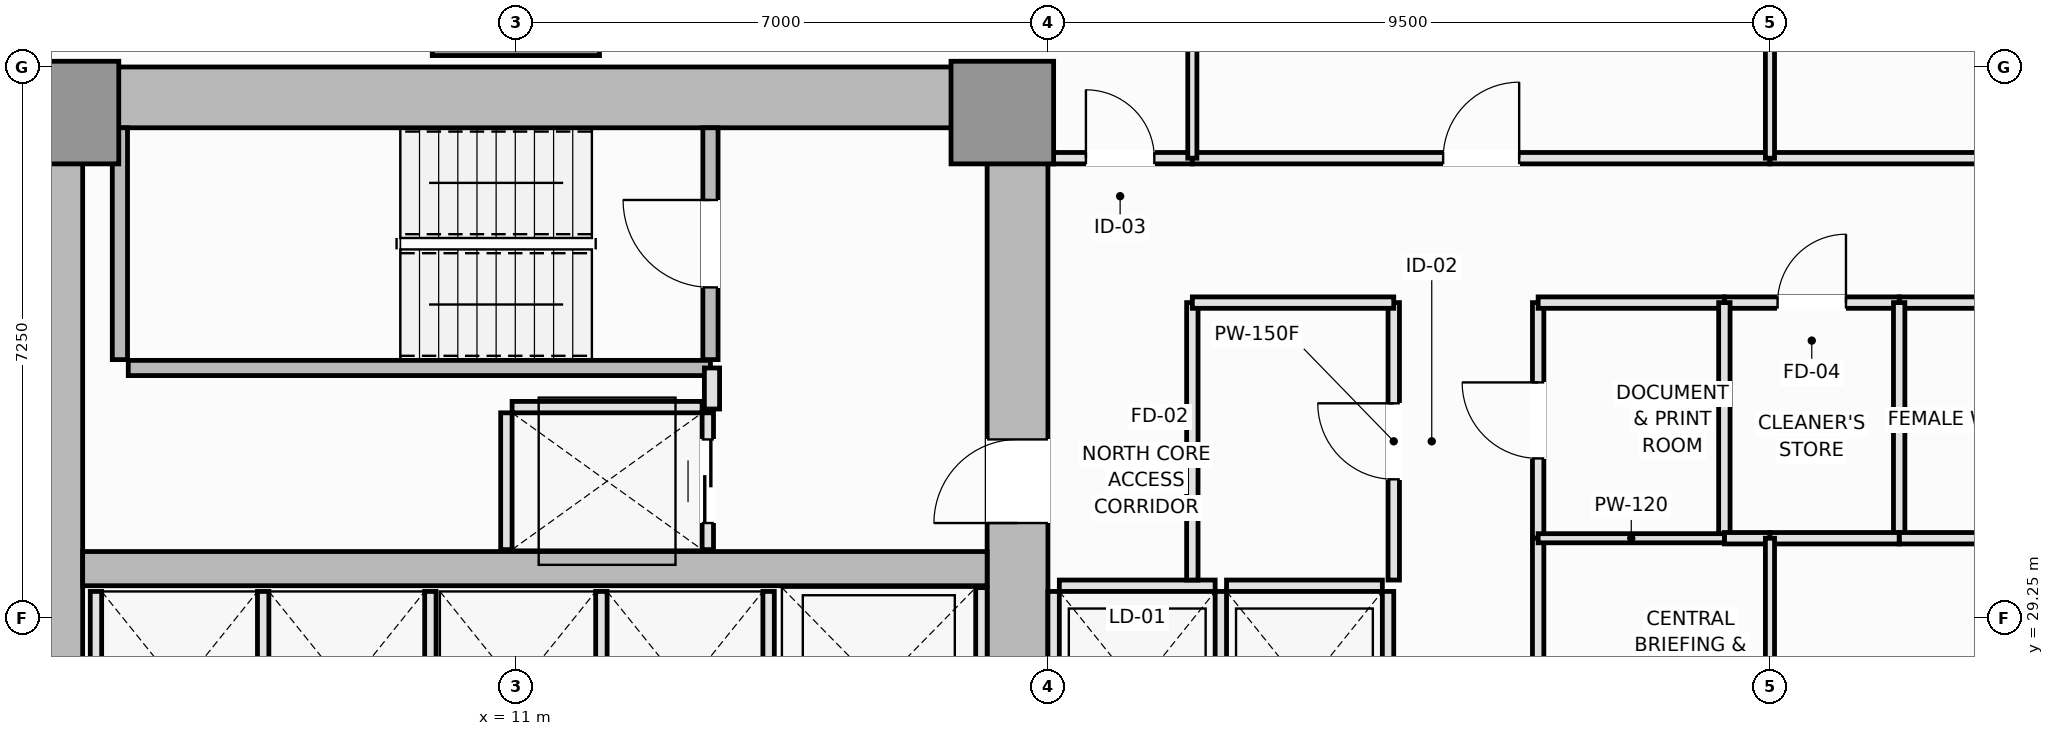
"""IFC4 building model, lengths in metres.
Left out: names, types, materials, properties, quantities, classifications, styles, units other than length and angle.
Written with IfcOpenShell. Run it as: python <this file> out.ifc"""

import sys

from ifc_helpers import new_model, si_unit, direction, frame, frame_2d, origin, origin_2d, place, context, subcontext, project, spatial, rectangle, extrude, element, fill, save


model = new_model("IFC4")
c1 = context("Model", 3, precision=1e-05, world=origin(), true_north=direction((0.0, 1.0)))
c2 = subcontext(c1, "Body", "Model", "MODEL_VIEW")
j1 = project(units=[si_unit("LENGTHUNIT", "METRE"), si_unit("PLANEANGLEUNIT", "RADIAN")], contexts=[c1])
p1 = place(None, origin())
s1 = spatial("IfcSite", under=j1, at=p1, CompositionType="ELEMENT")
p2 = place(p1, origin())
s2 = spatial("IfcBuilding", under=s1, at=p2, CompositionType="ELEMENT")
p3 = place(p2, frame((0.0, 0.0, 39.8)))
s3 = spatial("IfcBuildingStorey", under=s2, at=p3, CompositionType="ELEMENT", Elevation=39.8)
p4 = place(p3, frame((4.5, 36.1, 0.0), z_axis=(0.0, 0.0, 1.0), x_axis=(1.0, 0.0, 0.0)))
e1 = element("IfcWall", 1, at=p4, inside=s3, PredefinedType="SHEAR", context=c2, shape_type="SweptSolid", body=[
    extrude(rectangle(XDim=13.5, YDim=0.8, at=frame_2d((6.75, 0.0))), origin(), (0.0, 0.0, 1.0), 3.55),
])
p5 = place(p3, frame((4.9, 14.8, 0.0), z_axis=(0.0, 0.0, 1.0), x_axis=(0.0, 1.0, 0.0)))
e2 = element("IfcWall", 2, at=p5, inside=s3, PredefinedType="SHEAR", context=c2, shape_type="SweptSolid", body=[
    extrude(rectangle(XDim=20.9, YDim=0.8, at=frame_2d((10.45, 0.0))), origin(), (0.0, 0.0, 1.0), 3.55),
])
p6 = place(p3, frame((17.6, 27.05, 0.0), z_axis=(0.0, 0.0, 1.0), x_axis=(0.0, 1.0, 0.0)))
e3 = element("IfcWall", 3, at=p6, inside=s3, PredefinedType="SHEAR", context=c2, shape_type="SweptSolid", body=[
    extrude(rectangle(XDim=8.65, YDim=0.8, at=frame_2d((4.325, 0.0))), origin(), (0.0, 0.0, 1.0), 3.55),
])
p7 = place(p6, frame((3.45, 0.0, 0.0)))
e4 = element("IfcOpeningElement", 4, at=p7, cuts=e3, PredefinedType="OPENING", context=c2, shape_type="SweptSolid", body=[
    extrude(rectangle(XDim=1.1, YDim=2.15, at=frame_2d((0.55, 1.075))), frame((0.0, 0.41, 0.0), z_axis=(0.0, -1.0, 0.0), x_axis=(1.0, 0.0, 0.0)), (0.0, 0.0, 1.0), 0.82),
])
p8 = place(p3, frame((5.3, 29.9, 0.0), z_axis=(0.0, 0.0, 1.0), x_axis=(1.0, 0.0, 0.0)))
e5 = element("IfcWall", 5, at=p8, inside=s3, PredefinedType="SHEAR", context=c2, shape_type="SweptSolid", body=[
    extrude(rectangle(XDim=11.9, YDim=0.45, at=frame_2d((5.95, 0.0))), origin(), (0.0, 0.0, 1.0), 3.55),
])
for number, where, z_axis, x_axis in (
    (6, (5.1, 35.9, 0.0), (0.0, 0.0, 1.0), (1.0, 0.0, 0.0)),
    (7, (17.4, 35.9, 0.0), (0.0, 0.0, 1.0), (1.0, 0.0, 0.0)),
):
    element("IfcColumn", number, at=place(p3, frame(where, z_axis=z_axis, x_axis=x_axis)), inside=s3, PredefinedType="PILASTER", context=c2, shape_type="SweptSolid", body=[
        extrude(rectangle(XDim=1.35, YDim=1.35, at=origin_2d()), origin(), (0.0, 0.0, 1.0), 3.55),
    ])
p9 = place(p3, frame((11.0, 37.75, 0.0), z_axis=(0.0, 0.0, 1.0), x_axis=(1.0, 0.0, 0.0)))
e8 = element("IfcColumn", 8, at=p9, inside=s3, PredefinedType="COLUMN", context=c2, shape_type="SweptSolid", body=[
    extrude(rectangle(XDim=2.2, YDim=2.2, at=origin_2d()), origin(), (0.0, 0.0, 1.0), 3.55),
])
p10 = place(p3, frame((5.79, 32.65, 0.0), z_axis=(0.0, 0.0, 1.0), x_axis=(0.0, 1.0, 0.0)))
e9 = element("IfcWall", 9, at=p10, inside=s3, PredefinedType="SOLIDWALL", context=c2, shape_type="SweptSolid", body=[
    extrude(rectangle(XDim=3.05, YDim=0.2, at=frame_2d((1.525, 0.0))), origin(), (0.0, 0.0, 1.0), 3.55),
])
p11 = place(p3, frame((5.9, 32.54, 0.0), z_axis=(0.0, 0.0, 1.0), x_axis=(1.0, 0.0, 0.0)))
e10 = element("IfcWall", 10, at=p11, inside=s3, PredefinedType="SOLIDWALL", context=c2, shape_type="SweptSolid", body=[
    extrude(rectangle(XDim=7.66, YDim=0.2, at=frame_2d((3.83, 0.0))), origin(), (0.0, 0.0, 1.0), 3.55),
])
p12 = place(p3, frame((13.56, 32.65, 0.0), z_axis=(0.0, 0.0, 1.0), x_axis=(0.0, 1.0, 0.0)))
e11 = element("IfcWall", 11, at=p12, inside=s3, PredefinedType="SOLIDWALL", context=c2, shape_type="SweptSolid", body=[
    extrude(rectangle(XDim=3.05, YDim=0.2, at=frame_2d((1.525, 0.0))), origin(), (0.0, 0.0, 1.0), 3.55),
])
p13 = place(p12, frame((0.95, 0.0, 0.0)))
e12 = element("IfcOpeningElement", 12, at=p13, cuts=e11, PredefinedType="OPENING", context=c2, shape_type="SweptSolid", body=[
    extrude(rectangle(XDim=1.15, YDim=2.15, at=frame_2d((0.575, 1.075))), frame((0.0, 0.11, 0.0), z_axis=(0.0, -1.0, 0.0), x_axis=(1.0, 0.0, 0.0)), (0.0, 0.0, 1.0), 0.22),
])
p14 = place(p3, frame((18.15, 29.675, 0.0), z_axis=(0.0, 0.0, 1.0), x_axis=(1.0, 0.0, 0.0)))
e13 = element("IfcWall", 13, at=p14, inside=s3, PredefinedType="PARTITIONING", context=c2, shape_type="SweptSolid", body=[
    extrude(rectangle(XDim=2.05, YDim=0.15, at=frame_2d((1.025, 0.0))), origin(), (0.0, 0.0, 1.0), 3.37),
])
for number, where, z_axis, x_axis in (
    (14, (18.075, 27.05, 0.0), (0.0, 0.0, 1.0), (0.0, 1.0, 0.0)),
    (15, (20.275, 27.05, 0.0), (0.0, 0.0, 1.0), (0.0, 1.0, 0.0)),
):
    element("IfcWall", number, at=place(p3, frame(where, z_axis=z_axis, x_axis=x_axis)), inside=s3, PredefinedType="PARTITIONING", context=c2, shape_type="SweptSolid", body=[
        extrude(rectangle(XDim=2.55, YDim=0.15, at=frame_2d((1.275, 0.0))), origin(), (0.0, 0.0, 1.0), 3.37),
    ])
p15 = place(p3, frame((20.35, 29.675, 0.0), z_axis=(0.0, 0.0, 1.0), x_axis=(1.0, 0.0, 0.0)))
e16 = element("IfcWall", 16, at=p15, inside=s3, PredefinedType="PARTITIONING", context=c2, shape_type="SweptSolid", body=[
    extrude(rectangle(XDim=2.05, YDim=0.15, at=frame_2d((1.025, 0.0))), origin(), (0.0, 0.0, 1.0), 3.37),
])
for number, where, z_axis, x_axis in (
    (17, (22.475, 27.05, 0.0), (0.0, 0.0, 1.0), (0.0, 1.0, 0.0)),
    (18, (5.475, 27.05, 0.0), (0.0, 0.0, 1.0), (0.0, 1.0, 0.0)),
    (19, (7.675, 27.05, 0.0), (0.0, 0.0, 1.0), (0.0, 1.0, 0.0)),
    (20, (9.875, 27.05, 0.0), (0.0, 0.0, 1.0), (0.0, 1.0, 0.0)),
    (21, (12.125, 27.05, 0.0), (0.0, 0.0, 1.0), (0.0, 1.0, 0.0)),
    (22, (14.325, 27.05, 0.0), (0.0, 0.0, 1.0), (0.0, 1.0, 0.0)),
):
    element("IfcWall", number, at=place(p3, frame(where, z_axis=z_axis, x_axis=x_axis)), inside=s3, PredefinedType="PARTITIONING", context=c2, shape_type="SweptSolid", body=[
        extrude(rectangle(XDim=2.55, YDim=0.15, at=frame_2d((1.275, 0.0))), origin(), (0.0, 0.0, 1.0), 3.37),
    ])
p16 = place(p3, frame((17.125, 27.05, 0.0), z_axis=(0.0, 0.0, 1.0), x_axis=(0.0, 1.0, 0.0)))
e23 = element("IfcWall", 23, at=p16, inside=s3, PredefinedType="PARTITIONING", context=c2, shape_type="SweptSolid", body=[
    extrude(rectangle(XDim=2.6, YDim=0.15, at=frame_2d((1.3, 0.0))), origin(), (0.0, 0.0, 1.0), 3.37),
])
p17 = place(p3, frame((10.95, 32.025, 0.0), z_axis=(0.0, 0.0, 1.0), x_axis=(1.0, 0.0, 0.0)))
e24 = element("IfcWall", 24, at=p17, inside=s3, PredefinedType="PARTITIONING", context=c2, shape_type="SweptSolid", body=[
    extrude(rectangle(XDim=2.5, YDim=0.15, at=frame_2d((1.25, 0.0))), origin(), (0.0, 0.0, 1.0), 3.37),
])
p18 = place(p3, frame((10.875, 30.15, 0.0), z_axis=(0.0, 0.0, 1.0), x_axis=(0.0, 1.0, 0.0)))
e25 = element("IfcWall", 25, at=p18, inside=s3, PredefinedType="PARTITIONING", context=c2, shape_type="SweptSolid", body=[
    extrude(rectangle(XDim=1.8, YDim=0.15, at=frame_2d((0.9, 0.0))), origin(), (0.0, 0.0, 1.0), 3.37),
])
p19 = place(p3, frame((13.525, 30.15, 0.0), z_axis=(0.0, 0.0, 1.0), x_axis=(0.0, 1.0, 0.0)))
e26 = element("IfcWall", 26, at=p19, inside=s3, PredefinedType="PARTITIONING", context=c2, shape_type="SweptSolid", body=[
    extrude(rectangle(XDim=1.8, YDim=0.15, at=frame_2d((0.9, 0.0))), origin(), (0.0, 0.0, 1.0), 3.37),
])
p20 = place(p19, frame((0.35, 0.0, 0.0)))
e27 = element("IfcOpeningElement", 27, at=p20, cuts=e26, PredefinedType="OPENING", context=c2, shape_type="SweptSolid", body=[
    extrude(rectangle(XDim=1.1, YDim=2.2, at=frame_2d((0.55, 1.1))), frame((0.0, 0.085, 0.0), z_axis=(0.0, -1.0, 0.0), x_axis=(1.0, 0.0, 0.0)), (0.0, 0.0, 1.0), 0.17),
])
p21 = place(p3, frame((13.58, 32.0, 0.0), z_axis=(0.0, 0.0, 1.0), x_axis=(0.0, 1.0, 0.0)))
e28 = element("IfcWall", 28, at=p21, inside=s3, PredefinedType="PARTITIONING", context=c2, shape_type="SweptSolid", body=[
    extrude(rectangle(XDim=0.54, YDim=0.2, at=frame_2d((0.27, 0.0))), origin(), (0.0, 0.0, 1.0), 3.37),
])
p22 = place(p3, frame((22.55, 29.75, 0.0), z_axis=(0.0, 0.0, 1.0), x_axis=(0.0, 1.0, 0.0)))
e29 = element("IfcWall", 29, at=p22, inside=s3, PredefinedType="PARTITIONING", context=c2, shape_type="SweptSolid", body=[
    extrude(rectangle(XDim=3.65, YDim=0.15, at=frame_2d((1.825, 0.0))), origin(), (0.0, 0.0, 1.0), 3.01),
])
p23 = place(p22, frame((1.325, 0.0, 0.0)))
e30 = element("IfcOpeningElement", 30, at=p23, cuts=e29, PredefinedType="OPENING", context=c2, shape_type="SweptSolid", body=[
    extrude(rectangle(XDim=1.0, YDim=2.15, at=frame_2d((0.5, 1.075))), frame((0.0, 0.085, 0.0), z_axis=(0.0, -1.0, 0.0), x_axis=(1.0, 0.0, 0.0)), (0.0, 0.0, 1.0), 0.17),
])
p24 = place(p3, frame((24.45, 30.3, 0.0), z_axis=(0.0, 0.0, 1.0), x_axis=(0.0, 1.0, 0.0)))
e31 = element("IfcWall", 31, at=p24, inside=s3, PredefinedType="PARTITIONING", context=c2, shape_type="SweptSolid", body=[
    extrude(rectangle(XDim=3.1, YDim=0.15, at=frame_2d((1.55, 0.0))), origin(), (0.0, 0.0, 1.0), 3.37),
])
p25 = place(p24, frame((1.05, 0.0, 0.0)))
e32 = element("IfcOpeningElement", 32, at=p25, cuts=e31, PredefinedType="OPENING", context=c2, shape_type="SweptSolid", body=[
    extrude(rectangle(XDim=1.0, YDim=2.15, at=frame_2d((0.5, 1.075))), frame((0.0, 0.085, 0.0), z_axis=(0.0, -1.0, 0.0), x_axis=(1.0, 0.0, 0.0)), (0.0, 0.0, 1.0), 0.17),
])
p26 = place(p3, frame((24.45, 25.25, 0.0), z_axis=(0.0, 0.0, 1.0), x_axis=(0.0, 1.0, 0.0)))
e33 = element("IfcWall", 33, at=p26, inside=s3, PredefinedType="PARTITIONING", context=c2, shape_type="SweptSolid", body=[
    extrude(rectangle(XDim=5.05, YDim=0.15, at=frame_2d((2.525, 0.0))), origin(), (0.0, 0.0, 1.0), 3.37),
])
p27 = place(p26, frame((2.025, 0.0, 0.0)))
e34 = element("IfcOpeningElement", 34, at=p27, cuts=e33, PredefinedType="OPENING", context=c2, shape_type="SweptSolid", body=[
    extrude(rectangle(XDim=1.0, YDim=2.15, at=frame_2d((0.5, 1.075))), frame((0.0, 0.085, 0.0), z_axis=(0.0, -1.0, 0.0), x_axis=(1.0, 0.0, 0.0)), (0.0, 0.0, 1.0), 0.17),
])
p28 = place(p3, frame((19.9, 29.75, 0.0), z_axis=(0.0, 0.0, 1.0), x_axis=(0.0, 1.0, 0.0)))
e35 = element("IfcWall", 35, at=p28, inside=s3, PredefinedType="PARTITIONING", context=c2, shape_type="SweptSolid", body=[
    extrude(rectangle(XDim=3.65, YDim=0.15, at=frame_2d((1.825, 0.0))), origin(), (0.0, 0.0, 1.0), 3.37),
])
p29 = place(p3, frame((19.9, 33.4, 0.0), z_axis=(0.0, 0.0, 1.0), x_axis=(1.0, 0.0, 0.0)))
e36 = element("IfcWall", 36, at=p29, inside=s3, PredefinedType="PARTITIONING", context=c2, shape_type="SweptSolid", body=[
    extrude(rectangle(XDim=2.65, YDim=0.15, at=frame_2d((1.325, 0.0))), origin(), (0.0, 0.0, 1.0), 3.37),
])
p30 = place(p3, frame((29.2, 33.4, 0.0), z_axis=(0.0, 0.0, 1.0), x_axis=(1.0, 0.0, 0.0)))
e37 = element("IfcWall", 37, at=p30, inside=s3, PredefinedType="PLUMBINGWALL", context=c2, shape_type="SweptSolid", body=[
    extrude(rectangle(XDim=3.2, YDim=0.15, at=frame_2d((1.6, 0.0))), origin(), (0.0, 0.0, 1.0), 3.37),
])
p31 = place(p3, frame((26.9, 33.4, 0.0), z_axis=(0.0, 0.0, 1.0), x_axis=(1.0, 0.0, 0.0)))
e38 = element("IfcWall", 38, at=p31, inside=s3, PredefinedType="PLUMBINGWALL", context=c2, shape_type="SweptSolid", body=[
    extrude(rectangle(XDim=2.3, YDim=0.15, at=frame_2d((1.15, 0.0))), origin(), (0.0, 0.0, 1.0), 3.37),
])
p32 = place(p31, frame((0.7, 0.0, 0.0)))
e39 = element("IfcOpeningElement", 39, at=p32, cuts=e38, PredefinedType="OPENING", context=c2, shape_type="SweptSolid", body=[
    extrude(rectangle(XDim=0.9, YDim=2.1, at=frame_2d((0.45, 1.05))), frame((0.0, 0.085, 0.0), z_axis=(0.0, -1.0, 0.0), x_axis=(1.0, 0.0, 0.0)), (0.0, 0.0, 1.0), 0.17),
])
p33 = place(p3, frame((24.45, 33.4, 0.0), z_axis=(0.0, 0.0, 1.0), x_axis=(1.0, 0.0, 0.0)))
e40 = element("IfcWall", 40, at=p33, inside=s3, PredefinedType="PARTITIONING", context=c2, shape_type="SweptSolid", body=[
    extrude(rectangle(XDim=2.45, YDim=0.15, at=frame_2d((1.225, 0.0))), origin(), (0.0, 0.0, 1.0), 3.37),
])
p34 = place(p3, frame((18.0, 35.3, 0.0), z_axis=(0.0, 0.0, 1.0), x_axis=(1.0, 0.0, 0.0)))
e41 = element("IfcWall", 41, at=p34, inside=s3, PredefinedType="PARTITIONING", context=c2, shape_type="SweptSolid", body=[
    extrude(rectangle(XDim=1.9, YDim=0.15, at=frame_2d((0.95, 0.0))), origin(), (0.0, 0.0, 1.0), 3.37),
])
p35 = place(p34, frame((0.5, 0.0, 0.0)))
e42 = element("IfcOpeningElement", 42, at=p35, cuts=e41, PredefinedType="OPENING", context=c2, shape_type="SweptSolid", body=[
    extrude(rectangle(XDim=0.9, YDim=2.1, at=frame_2d((0.45, 1.05))), frame((0.0, 0.085, 0.0), z_axis=(0.0, -1.0, 0.0), x_axis=(1.0, 0.0, 0.0)), (0.0, 0.0, 1.0), 0.17),
])
p36 = place(p3, frame((19.9, 35.3, 0.0), z_axis=(0.0, 0.0, 1.0), x_axis=(1.0, 0.0, 0.0)))
e43 = element("IfcWall", 43, at=p36, inside=s3, PredefinedType="PARTITIONING", context=c2, shape_type="SweptSolid", body=[
    extrude(rectangle(XDim=7.6, YDim=0.15, at=frame_2d((3.8, 0.0))), origin(), (0.0, 0.0, 1.0), 3.37),
])
p37 = place(p36, frame((3.3, 0.0, 0.0)))
e44 = element("IfcOpeningElement", 44, at=p37, cuts=e43, PredefinedType="OPENING", context=c2, shape_type="SweptSolid", body=[
    extrude(rectangle(XDim=1.0, YDim=2.15, at=frame_2d((0.5, 1.075))), frame((0.0, 0.085, 0.0), z_axis=(0.0, -1.0, 0.0), x_axis=(1.0, 0.0, 0.0)), (0.0, 0.0, 1.0), 0.17),
])
p38 = place(p3, frame((27.5, 35.3, 0.0), z_axis=(0.0, 0.0, 1.0), x_axis=(1.0, 0.0, 0.0)))
e45 = element("IfcWall", 45, at=p38, inside=s3, PredefinedType="PARTITIONING", context=c2, shape_type="SweptSolid", body=[
    extrude(rectangle(XDim=6.8, YDim=0.15, at=frame_2d((3.4, 0.0))), origin(), (0.0, 0.0, 1.0), 3.37),
])
p39 = place(p38, frame((2.9, 0.0, 0.0)))
e46 = element("IfcOpeningElement", 46, at=p39, cuts=e45, PredefinedType="OPENING", context=c2, shape_type="SweptSolid", body=[
    extrude(rectangle(XDim=1.0, YDim=2.15, at=frame_2d((0.5, 1.075))), frame((0.0, 0.085, 0.0), z_axis=(0.0, -1.0, 0.0), x_axis=(1.0, 0.0, 0.0)), (0.0, 0.0, 1.0), 0.17),
])
p40 = place(p3, frame((29.2, 30.3, 0.0), z_axis=(0.0, 0.0, 1.0), x_axis=(0.0, 1.0, 0.0)))
e47 = element("IfcWall", 47, at=p40, inside=s3, PredefinedType="PLUMBINGWALL", context=c2, shape_type="SweptSolid", body=[
    extrude(rectangle(XDim=3.1, YDim=0.15, at=frame_2d((1.55, 0.0))), origin(), (0.0, 0.0, 1.0), 3.37),
])
p41 = place(p3, frame((29.2, 30.3, 0.0), z_axis=(0.0, 0.0, 1.0), x_axis=(1.0, 0.0, 0.0)))
e48 = element("IfcWall", 48, at=p41, inside=s3, PredefinedType="PLUMBINGWALL", context=c2, shape_type="SweptSolid", body=[
    extrude(rectangle(XDim=3.2, YDim=0.15, at=frame_2d((1.6, 0.0))), origin(), (0.0, 0.0, 1.0), 3.37),
])
p42 = place(p3, frame((26.9, 30.3, 0.0), z_axis=(0.0, 0.0, 1.0), x_axis=(0.0, 1.0, 0.0)))
e49 = element("IfcWall", 49, at=p42, inside=s3, PredefinedType="PLUMBINGWALL", context=c2, shape_type="SweptSolid", body=[
    extrude(rectangle(XDim=3.1, YDim=0.15, at=frame_2d((1.55, 0.0))), origin(), (0.0, 0.0, 1.0), 3.37),
])
p43 = place(p3, frame((26.9, 30.3, 0.0), z_axis=(0.0, 0.0, 1.0), x_axis=(1.0, 0.0, 0.0)))
e50 = element("IfcWall", 50, at=p43, inside=s3, PredefinedType="PLUMBINGWALL", context=c2, shape_type="SweptSolid", body=[
    extrude(rectangle(XDim=0.6, YDim=0.15, at=frame_2d((0.3, 0.0))), origin(), (0.0, 0.0, 1.0), 3.37),
])
p44 = place(p3, frame((27.5, 30.3, 0.0), z_axis=(0.0, 0.0, 1.0), x_axis=(1.0, 0.0, 0.0)))
e51 = element("IfcWall", 51, at=p44, inside=s3, PredefinedType="PLUMBINGWALL", context=c2, shape_type="SweptSolid", body=[
    extrude(rectangle(XDim=1.7, YDim=0.15, at=frame_2d((0.85, 0.0))), origin(), (0.0, 0.0, 1.0), 3.37),
])
p45 = place(p3, frame((24.45, 30.3, 0.0), z_axis=(0.0, 0.0, 1.0), x_axis=(1.0, 0.0, 0.0)))
e52 = element("IfcWall", 52, at=p45, inside=s3, PredefinedType="PARTITIONING", context=c2, shape_type="SweptSolid", body=[
    extrude(rectangle(XDim=2.45, YDim=0.12, at=frame_2d((1.225, 0.0))), origin(), (0.0, 0.0, 1.0), 3.37),
])
p46 = place(p3, frame((27.5, 25.25, 0.0), z_axis=(0.0, 0.0, 1.0), x_axis=(0.0, 1.0, 0.0)))
e53 = element("IfcWall", 53, at=p46, inside=s3, PredefinedType="PARTITIONING", context=c2, shape_type="SweptSolid", body=[
    extrude(rectangle(XDim=5.05, YDim=0.12, at=frame_2d((2.525, 0.0))), origin(), (0.0, 0.0, 1.0), 3.37),
])
p47 = place(p3, frame((19.9, 35.3, 0.0), z_axis=(0.0, 0.0, 1.0), x_axis=(0.0, 1.0, 0.0)))
e54 = element("IfcWall", 54, at=p47, inside=s3, PredefinedType="PARTITIONING", context=c2, shape_type="SweptSolid", body=[
    extrude(rectangle(XDim=12.69, YDim=0.12, at=frame_2d((6.345, 0.0))), origin(), (0.0, 0.0, 1.0), 3.37),
])
p48 = place(p3, frame((27.5, 35.3, 0.0), z_axis=(0.0, 0.0, 1.0), x_axis=(0.0, 1.0, 0.0)))
e55 = element("IfcWall", 55, at=p48, inside=s3, PredefinedType="PARTITIONING", context=c2, shape_type="SweptSolid", body=[
    extrude(rectangle(XDim=12.69, YDim=0.12, at=frame_2d((6.345, 0.0))), origin(), (0.0, 0.0, 1.0), 2.82),
])
p49 = place(p13, origin())
e56 = element("IfcDoor", 56, at=p49, inside=s3, OperationType="SINGLE_SWING_RIGHT", PredefinedType="DOOR", context=c2, shape_type="SweptSolid", body=[
    extrude(rectangle(XDim=1.15, YDim=2.15, at=frame_2d((0.575, 1.075))), frame((0.0, 0.025, 0.0), z_axis=(0.0, -1.0, 0.0), x_axis=(1.0, 0.0, 0.0)), (0.0, 0.0, 1.0), 0.05),
])
fill(e12, e56)
p50 = place(p20, origin())
e57 = element("IfcDoor", 57, at=p50, inside=s3, OperationType="DOUBLE_DOOR_SLIDING", PredefinedType="DOOR", context=c2, shape_type="SweptSolid", body=[
    extrude(rectangle(XDim=1.1, YDim=2.2, at=frame_2d((0.55, 1.1))), frame((0.0, 0.025, 0.0), z_axis=(0.0, -1.0, 0.0), x_axis=(1.0, 0.0, 0.0)), (0.0, 0.0, 1.0), 0.05),
])
fill(e27, e57)
p51 = place(p7, origin())
e58 = element("IfcDoor", 58, at=p51, inside=s3, OperationType="SINGLE_SWING_LEFT", PredefinedType="DOOR", context=c2, shape_type="SweptSolid", body=[
    extrude(rectangle(XDim=1.1, YDim=2.15, at=frame_2d((0.55, 1.075))), frame((0.0, 0.025, 0.0), z_axis=(0.0, -1.0, 0.0), x_axis=(1.0, 0.0, 0.0)), (0.0, 0.0, 1.0), 0.05),
])
fill(e4, e58)
p52 = place(p23, origin())
e59 = element("IfcDoor", 59, at=p52, inside=s3, OperationType="SINGLE_SWING_RIGHT", PredefinedType="DOOR", context=c2, shape_type="SweptSolid", body=[
    extrude(rectangle(XDim=1.0, YDim=2.15, at=frame_2d((0.5, 1.075))), frame((0.0, 0.025, 0.0), z_axis=(0.0, -1.0, 0.0), x_axis=(1.0, 0.0, 0.0)), (0.0, 0.0, 1.0), 0.05),
])
fill(e30, e59)
p53 = place(p25, origin())
e60 = element("IfcDoor", 60, at=p53, inside=s3, OperationType="SINGLE_SWING_RIGHT", PredefinedType="DOOR", context=c2, shape_type="SweptSolid", body=[
    extrude(rectangle(XDim=1.0, YDim=2.15, at=frame_2d((0.5, 1.075))), frame((0.0, 0.025, 0.0), z_axis=(0.0, -1.0, 0.0), x_axis=(1.0, 0.0, 0.0)), (0.0, 0.0, 1.0), 0.05),
])
fill(e32, e60)
p54 = place(p32, origin())
e61 = element("IfcDoor", 61, at=p54, inside=s3, OperationType="SINGLE_SWING_RIGHT", PredefinedType="DOOR", context=c2, shape_type="SweptSolid", body=[
    extrude(rectangle(XDim=0.9, YDim=2.1, at=frame_2d((0.45, 1.05))), frame((0.0, 0.025, 0.0), z_axis=(0.0, -1.0, 0.0), x_axis=(1.0, 0.0, 0.0)), (0.0, 0.0, 1.0), 0.05),
])
fill(e39, e61)
p55 = place(p35, origin())
e62 = element("IfcDoor", 62, at=p55, inside=s3, OperationType="SINGLE_SWING_LEFT", PredefinedType="DOOR", context=c2, shape_type="SweptSolid", body=[
    extrude(rectangle(XDim=0.9, YDim=2.1, at=frame_2d((0.45, 1.05))), frame((0.0, 0.025, 0.0), z_axis=(0.0, -1.0, 0.0), x_axis=(1.0, 0.0, 0.0)), (0.0, 0.0, 1.0), 0.05),
])
fill(e42, e62)
p56 = place(p37, origin())
e63 = element("IfcDoor", 63, at=p56, inside=s3, OperationType="SINGLE_SWING_RIGHT", PredefinedType="DOOR", context=c2, shape_type="SweptSolid", body=[
    extrude(rectangle(XDim=1.0, YDim=2.15, at=frame_2d((0.5, 1.075))), frame((0.0, 0.025, 0.0), z_axis=(0.0, -1.0, 0.0), x_axis=(1.0, 0.0, 0.0)), (0.0, 0.0, 1.0), 0.05),
])
fill(e44, e63)
save(model, sys.argv[1])
